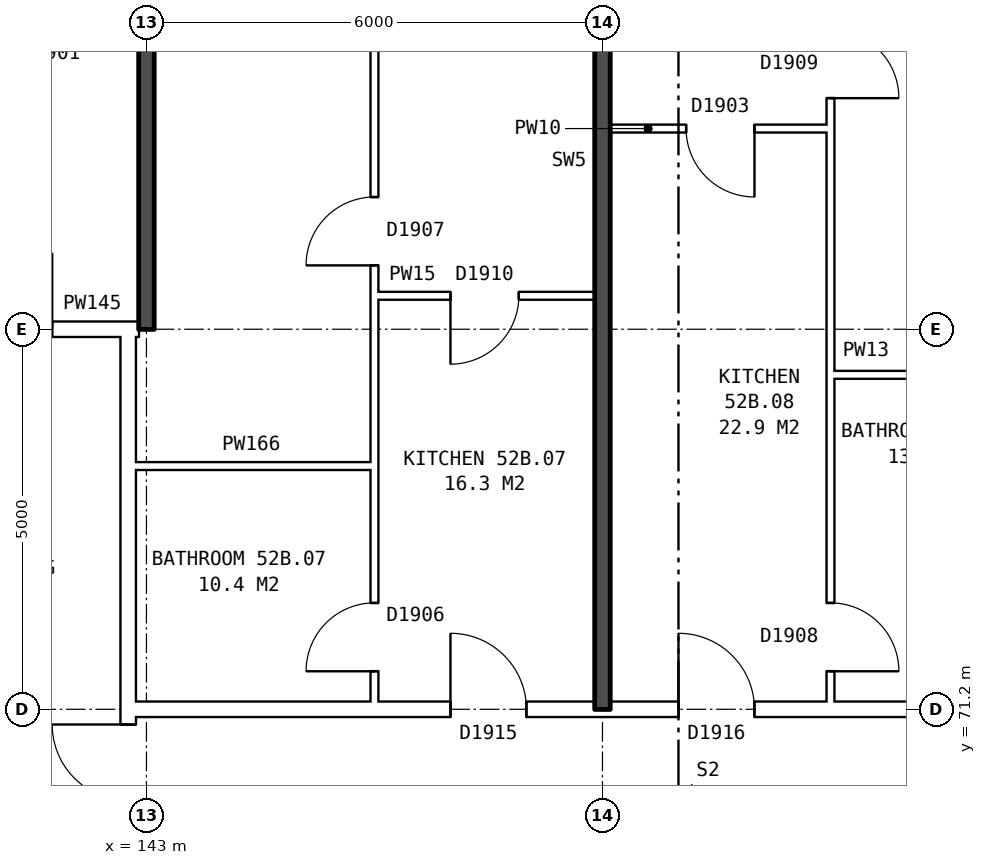
"""IFC4 building model, lengths in metres.
Left out: names, types, materials, properties, quantities, classifications, styles, units other than length and angle.
Written with IfcOpenShell. Run it as: python <this file> out.ifc"""

import sys

from ifc_helpers import new_model, si_unit, direction, frame, frame_2d, origin, place, context, subcontext, project, spatial, rectangle, extrude, element, fill, save


model = new_model("IFC4")
c1 = context("Model", 3, precision=1e-05, world=origin(), true_north=direction((0.0, 1.0)))
c2 = subcontext(c1, "Body", "Model", "MODEL_VIEW")
j1 = project(units=[si_unit("LENGTHUNIT", "METRE"), si_unit("PLANEANGLEUNIT", "RADIAN")], contexts=[c1])
p1 = place(None, origin())
s1 = spatial("IfcSite", under=j1, at=p1, CompositionType="ELEMENT")
p2 = place(p1, origin())
s2 = spatial("IfcBuilding", under=s1, at=p2, CompositionType="ELEMENT")
p3 = place(p2, frame((0.0, 0.0, 185.1)))
s3 = spatial("IfcBuildingStorey", under=s2, at=p3, CompositionType="ELEMENT", Elevation=185.1)
p4 = place(p3, frame((142.76, 63.9, 0.0), z_axis=(0.0, 0.0, 1.0), x_axis=(0.0, 1.0, 0.0)))
e1 = element("IfcWall", 1, at=p4, inside=s3, PredefinedType="PARTITIONING", context=c2, shape_type="SweptSolid", body=[
    extrude(rectangle(XDim=12.2, YDim=0.2, at=frame_2d((6.1, 0.0))), origin(), (0.0, 0.0, 1.0), 2.85),
])
p5 = place(p4, frame((5.1, 0.0, 0.0)))
e2 = element("IfcOpeningElement", 2, at=p5, cuts=e1, PredefinedType="OPENING", context=c2, shape_type="SweptSolid", body=[
    extrude(rectangle(XDim=2.0, YDim=2.1, at=frame_2d((1.0, 1.05))), frame((0.0, 0.11, 0.0), z_axis=(0.0, -1.0, 0.0), x_axis=(1.0, 0.0, 0.0)), (0.0, 0.0, 1.0), 0.22),
])
p6 = place(p3, frame((142.76, 71.2, 0.0), z_axis=(0.0, 0.0, 1.0), x_axis=(1.0, 0.0, 0.0)))
e3 = element("IfcWall", 3, at=p6, inside=s3, PredefinedType="PARTITIONING", context=c2, shape_type="SweptSolid", body=[
    extrude(rectangle(XDim=14.48, YDim=0.2, at=frame_2d((7.24, 0.0))), origin(), (0.0, 0.0, 1.0), 2.85),
])
p7 = place(p6, frame((4.24, 0.0, 0.0)))
e4 = element("IfcOpeningElement", 4, at=p7, cuts=e3, PredefinedType="OPENING", context=c2, shape_type="SweptSolid", body=[
    extrude(rectangle(XDim=1.0, YDim=2.1, at=frame_2d((0.5, 1.05))), frame((0.0, 0.11, 0.0), z_axis=(0.0, -1.0, 0.0), x_axis=(1.0, 0.0, 0.0)), (0.0, 0.0, 1.0), 0.22),
])
p8 = place(p6, frame((7.24, 0.0, 0.0)))
e5 = element("IfcOpeningElement", 5, at=p8, cuts=e3, PredefinedType="OPENING", context=c2, shape_type="SweptSolid", body=[
    extrude(rectangle(XDim=1.0, YDim=2.1, at=frame_2d((0.5, 1.05))), frame((0.0, 0.11, 0.0), z_axis=(0.0, -1.0, 0.0), x_axis=(1.0, 0.0, 0.0)), (0.0, 0.0, 1.0), 0.22),
])
p9 = place(p3, frame((142.76, 74.4, 0.0), z_axis=(0.0, 0.0, 1.0), x_axis=(1.0, 0.0, 0.0)))
e6 = element("IfcWall", 6, at=p9, inside=s3, PredefinedType="PARTITIONING", context=c2, shape_type="SweptSolid", body=[
    extrude(rectangle(XDim=3.24, YDim=0.1, at=frame_2d((1.62, 0.0))), origin(), (0.0, 0.0, 1.0), 2.85),
])
p10 = place(p3, frame((152.0, 75.6, 0.0), z_axis=(0.0, 0.0, 1.0), x_axis=(1.0, 0.0, 0.0)))
e7 = element("IfcWall", 7, at=p10, inside=s3, PredefinedType="PARTITIONING", context=c2, shape_type="SweptSolid", body=[
    extrude(rectangle(XDim=2.9, YDim=0.1, at=frame_2d((1.45, 0.0))), origin(), (0.0, 0.0, 1.0), 2.85),
])
p11 = place(p3, frame((139.76, 76.2, 0.0), z_axis=(0.0, 0.0, 1.0), x_axis=(1.0, 0.0, 0.0)))
e8 = element("IfcWall", 8, at=p11, inside=s3, PredefinedType="PARTITIONING", context=c2, shape_type="SweptSolid", body=[
    extrude(rectangle(XDim=3.0, YDim=0.2, at=frame_2d((1.5, 0.0))), origin(), (0.0, 0.0, 1.0), 2.85),
])
p12 = place(p11, frame((1.0, 0.0, 0.0)))
e9 = element("IfcOpeningElement", 9, at=p12, cuts=e8, PredefinedType="OPENING", context=c2, shape_type="SweptSolid", body=[
    extrude(rectangle(XDim=1.0, YDim=2.1, at=frame_2d((0.5, 1.05))), frame((0.0, 0.11, 0.0), z_axis=(0.0, -1.0, 0.0), x_axis=(1.0, 0.0, 0.0)), (0.0, 0.0, 1.0), 0.22),
])
p13 = place(p3, frame((142.76, 76.2, 0.0), z_axis=(0.0, 0.0, 1.0), x_axis=(1.0, 0.0, 0.0)))
e10 = element("IfcWall", 10, at=p13, inside=s3, PredefinedType="PARTITIONING", context=c2, shape_type="SweptSolid", body=[
    extrude(rectangle(XDim=0.14, YDim=0.2, at=frame_2d((0.07, 0.0))), origin(), (0.0, 0.0, 1.0), 2.85),
])
p14 = place(p3, frame((146.0, 76.64, 0.0), z_axis=(0.0, 0.0, 1.0), x_axis=(1.0, 0.0, 0.0)))
e11 = element("IfcWall", 11, at=p14, inside=s3, PredefinedType="PARTITIONING", context=c2, shape_type="SweptSolid", body=[
    extrude(rectangle(XDim=2.9, YDim=0.1, at=frame_2d((1.45, 0.0))), origin(), (0.0, 0.0, 1.0), 2.85),
])
p15 = place(p14, frame((1.0, 0.0, 0.0)))
e12 = element("IfcOpeningElement", 12, at=p15, cuts=e11, PredefinedType="OPENING", context=c2, shape_type="SweptSolid", body=[
    extrude(rectangle(XDim=0.9, YDim=2.1, at=frame_2d((0.45, 1.05))), frame((0.0, 0.06, 0.0), z_axis=(0.0, -1.0, 0.0), x_axis=(1.0, 0.0, 0.0)), (0.0, 0.0, 1.0), 0.12),
])
p16 = place(p3, frame((149.1, 78.84, 0.0), z_axis=(0.0, 0.0, 1.0), x_axis=(1.0, 0.0, 0.0)))
e13 = element("IfcWall", 13, at=p16, inside=s3, PredefinedType="PARTITIONING", context=c2, shape_type="SweptSolid", body=[
    extrude(rectangle(XDim=2.9, YDim=0.1, at=frame_2d((1.45, 0.0))), origin(), (0.0, 0.0, 1.0), 2.85),
])
p17 = place(p16, frame((1.0, 0.0, 0.0)))
e14 = element("IfcOpeningElement", 14, at=p17, cuts=e13, PredefinedType="OPENING", context=c2, shape_type="SweptSolid", body=[
    extrude(rectangle(XDim=0.9, YDim=2.1, at=frame_2d((0.45, 1.05))), frame((0.0, 0.06, 0.0), z_axis=(0.0, -1.0, 0.0), x_axis=(1.0, 0.0, 0.0)), (0.0, 0.0, 1.0), 0.12),
])
p18 = place(p3, frame((143.0, 76.2, 0.0), z_axis=(0.0, 0.0, 1.0), x_axis=(0.0, 1.0, 0.0)))
e15 = element("IfcWall", 15, at=p18, inside=s3, PredefinedType="SOLIDWALL", context=c2, shape_type="SweptSolid", body=[
    extrude(rectangle(XDim=9.44, YDim=0.2, at=frame_2d((4.72, 0.0))), origin(), (0.0, 0.0, 1.0), 2.85),
])
p19 = place(p3, frame((146.0, 71.3, 0.0), z_axis=(0.0, 0.0, 1.0), x_axis=(0.0, 1.0, 0.0)))
e16 = element("IfcWall", 16, at=p19, inside=s3, PredefinedType="PARTITIONING", context=c2, shape_type="SweptSolid", body=[
    extrude(rectangle(XDim=14.34, YDim=0.1, at=frame_2d((7.17, 0.0))), origin(), (0.0, 0.0, 1.0), 2.85),
])
p20 = place(p19, frame((5.74, 0.0, 0.0)))
e17 = element("IfcOpeningElement", 17, at=p20, cuts=e16, PredefinedType="OPENING", context=c2, shape_type="SweptSolid", body=[
    extrude(rectangle(XDim=0.9, YDim=2.1, at=frame_2d((0.45, 1.05))), frame((0.0, 0.06, 0.0), z_axis=(0.0, -1.0, 0.0), x_axis=(1.0, 0.0, 0.0)), (0.0, 0.0, 1.0), 0.12),
])
p21 = place(p19, frame((0.4, 0.0, 0.0)))
e18 = element("IfcOpeningElement", 18, at=p21, cuts=e16, PredefinedType="OPENING", context=c2, shape_type="SweptSolid", body=[
    extrude(rectangle(XDim=0.9, YDim=2.1, at=frame_2d((0.45, 1.05))), frame((0.0, 0.06, 0.0), z_axis=(0.0, -1.0, 0.0), x_axis=(1.0, 0.0, 0.0)), (0.0, 0.0, 1.0), 0.12),
])
p22 = place(p3, frame((149.0, 71.2, 0.0), z_axis=(0.0, 0.0, 1.0), x_axis=(0.0, 1.0, 0.0)))
e19 = element("IfcWall", 19, at=p22, inside=s3, PredefinedType="SOLIDWALL", context=c2, shape_type="SweptSolid", body=[
    extrude(rectangle(XDim=14.44, YDim=0.2, at=frame_2d((7.22, 0.0))), origin(), (0.0, 0.0, 1.0), 2.85),
])
p23 = place(p3, frame((152.0, 71.3, 0.0), z_axis=(0.0, 0.0, 1.0), x_axis=(0.0, 1.0, 0.0)))
e20 = element("IfcWall", 20, at=p23, inside=s3, PredefinedType="PARTITIONING", context=c2, shape_type="SweptSolid", body=[
    extrude(rectangle(XDim=14.34, YDim=0.1, at=frame_2d((7.17, 0.0))), origin(), (0.0, 0.0, 1.0), 2.85),
])
p24 = place(p23, frame((7.94, 0.0, 0.0)))
e21 = element("IfcOpeningElement", 21, at=p24, cuts=e20, PredefinedType="OPENING", context=c2, shape_type="SweptSolid", body=[
    extrude(rectangle(XDim=0.9, YDim=2.1, at=frame_2d((0.45, 1.05))), frame((0.0, 0.06, 0.0), z_axis=(0.0, -1.0, 0.0), x_axis=(1.0, 0.0, 0.0)), (0.0, 0.0, 1.0), 0.12),
])
p25 = place(p23, frame((0.4, 0.0, 0.0)))
e22 = element("IfcOpeningElement", 22, at=p25, cuts=e20, PredefinedType="OPENING", context=c2, shape_type="SweptSolid", body=[
    extrude(rectangle(XDim=0.9, YDim=2.1, at=frame_2d((0.45, 1.05))), frame((0.0, 0.06, 0.0), z_axis=(0.0, -1.0, 0.0), x_axis=(1.0, 0.0, 0.0)), (0.0, 0.0, 1.0), 0.12),
])
p26 = place(p5, origin())
e23 = element("IfcDoor", 23, at=p26, inside=s3, OperationType="DOUBLE_DOOR_SINGLE_SWING", PredefinedType="DOOR", context=c2, shape_type="SweptSolid", body=[
    extrude(rectangle(XDim=2.0, YDim=2.1, at=frame_2d((1.0, 1.05))), frame((0.0, 0.025, 0.0), z_axis=(0.0, -1.0, 0.0), x_axis=(1.0, 0.0, 0.0)), (0.0, 0.0, 1.0), 0.05),
])
fill(e2, e23)
p27 = place(p20, origin())
e24 = element("IfcDoor", 24, at=p27, inside=s3, OperationType="SINGLE_SWING_LEFT", PredefinedType="DOOR", context=c2, shape_type="SweptSolid", body=[
    extrude(rectangle(XDim=0.9, YDim=2.1, at=frame_2d((0.45, 1.05))), frame((0.0, 0.025, 0.0), z_axis=(0.0, -1.0, 0.0), x_axis=(1.0, 0.0, 0.0)), (0.0, 0.0, 1.0), 0.05),
])
fill(e17, e24)
p28 = place(p7, origin())
e25 = element("IfcDoor", 25, at=p28, inside=s3, OperationType="SINGLE_SWING_LEFT", PredefinedType="DOOR", context=c2, shape_type="SweptSolid", body=[
    extrude(rectangle(XDim=1.0, YDim=2.1, at=frame_2d((0.5, 1.05))), frame((0.0, 0.025, 0.0), z_axis=(0.0, -1.0, 0.0), x_axis=(1.0, 0.0, 0.0)), (0.0, 0.0, 1.0), 0.05),
])
fill(e4, e25)
p29 = place(p15, frame((0.9, 0.0, 0.0), z_axis=(0.0, 0.0, 1.0), x_axis=(-1.0, 0.0, 0.0)))
e26 = element("IfcDoor", 26, at=p29, inside=s3, OperationType="SINGLE_SWING_RIGHT", PredefinedType="DOOR", context=c2, shape_type="SweptSolid", body=[
    extrude(rectangle(XDim=0.9, YDim=2.1, at=frame_2d((0.45, 1.05))), frame((0.0, 0.025, 0.0), z_axis=(0.0, -1.0, 0.0), x_axis=(1.0, 0.0, 0.0)), (0.0, 0.0, 1.0), 0.05),
])
fill(e12, e26)
p30 = place(p21, origin())
e27 = element("IfcDoor", 27, at=p30, inside=s3, OperationType="SINGLE_SWING_LEFT", PredefinedType="DOOR", context=c2, shape_type="SweptSolid", body=[
    extrude(rectangle(XDim=0.9, YDim=2.1, at=frame_2d((0.45, 1.05))), frame((0.0, 0.025, 0.0), z_axis=(0.0, -1.0, 0.0), x_axis=(1.0, 0.0, 0.0)), (0.0, 0.0, 1.0), 0.05),
])
fill(e18, e27)
p31 = place(p24, frame((0.9, 0.0, 0.0), z_axis=(0.0, 0.0, 1.0), x_axis=(-1.0, 0.0, 0.0)))
e28 = element("IfcDoor", 28, at=p31, inside=s3, OperationType="SINGLE_SWING_RIGHT", PredefinedType="DOOR", context=c2, shape_type="SweptSolid", body=[
    extrude(rectangle(XDim=0.9, YDim=2.1, at=frame_2d((0.45, 1.05))), frame((0.0, 0.025, 0.0), z_axis=(0.0, -1.0, 0.0), x_axis=(1.0, 0.0, 0.0)), (0.0, 0.0, 1.0), 0.05),
])
fill(e21, e28)
p32 = place(p8, origin())
e29 = element("IfcDoor", 29, at=p32, inside=s3, OperationType="SINGLE_SWING_LEFT", PredefinedType="DOOR", context=c2, shape_type="SweptSolid", body=[
    extrude(rectangle(XDim=1.0, YDim=2.1, at=frame_2d((0.5, 1.05))), frame((0.0, 0.025, 0.0), z_axis=(0.0, -1.0, 0.0), x_axis=(1.0, 0.0, 0.0)), (0.0, 0.0, 1.0), 0.05),
])
fill(e5, e29)
p33 = place(p17, frame((0.9, 0.0, 0.0), z_axis=(0.0, 0.0, 1.0), x_axis=(-1.0, 0.0, 0.0)))
e30 = element("IfcDoor", 30, at=p33, inside=s3, OperationType="SINGLE_SWING_LEFT", PredefinedType="DOOR", context=c2, shape_type="SweptSolid", body=[
    extrude(rectangle(XDim=0.9, YDim=2.1, at=frame_2d((0.45, 1.05))), frame((0.0, 0.025, 0.0), z_axis=(0.0, -1.0, 0.0), x_axis=(1.0, 0.0, 0.0)), (0.0, 0.0, 1.0), 0.05),
])
fill(e14, e30)
p34 = place(p25, frame((0.9, 0.0, 0.0), z_axis=(0.0, 0.0, 1.0), x_axis=(-1.0, 0.0, 0.0)))
e31 = element("IfcDoor", 31, at=p34, inside=s3, OperationType="SINGLE_SWING_RIGHT", PredefinedType="DOOR", context=c2, shape_type="SweptSolid", body=[
    extrude(rectangle(XDim=0.9, YDim=2.1, at=frame_2d((0.45, 1.05))), frame((0.0, 0.025, 0.0), z_axis=(0.0, -1.0, 0.0), x_axis=(1.0, 0.0, 0.0)), (0.0, 0.0, 1.0), 0.05),
])
fill(e22, e31)
save(model, sys.argv[1])
